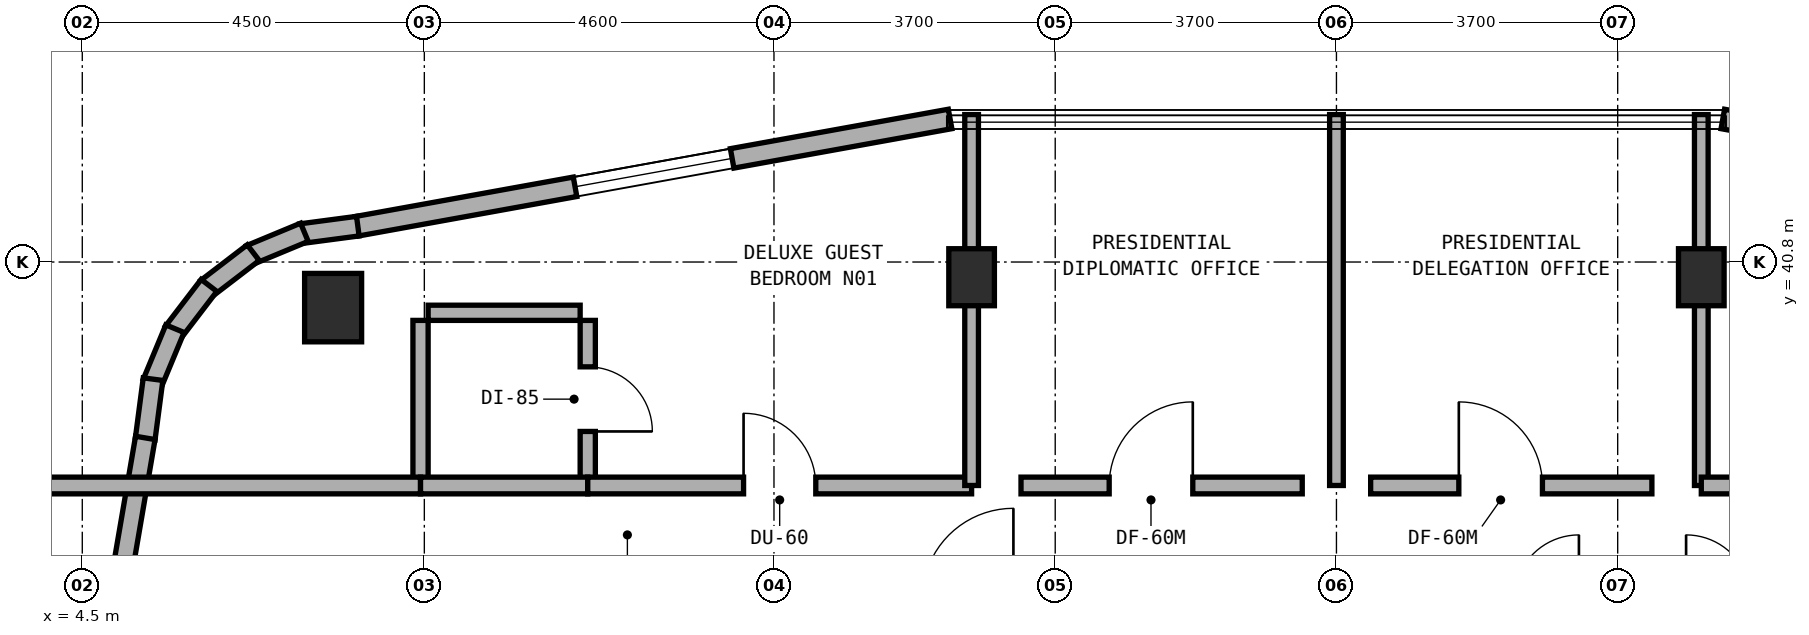
"""IFC4 building model, lengths in metres.
Left out: names, types, materials, properties, quantities, classifications, styles, units other than length and angle.
Written with IfcOpenShell. Run it as: python <this file> out.ifc"""

import sys

from ifc_helpers import new_model, si_unit, direction, frame, frame_2d, origin, origin_2d, place, context, subcontext, project, spatial, rectangle, extrude, element, fill, save


model = new_model("IFC4")
c1 = context("Model", 3, precision=1e-05, world=origin(), true_north=direction((0.0, 1.0)))
c2 = subcontext(c1, "Body", "Model", "MODEL_VIEW")
j1 = project(units=[si_unit("LENGTHUNIT", "METRE"), si_unit("PLANEANGLEUNIT", "RADIAN")], contexts=[c1])
p1 = place(None, origin())
s1 = spatial("IfcSite", under=j1, at=p1, CompositionType="ELEMENT")
p2 = place(p1, origin())
s2 = spatial("IfcBuilding", under=s1, at=p2, CompositionType="ELEMENT")
p3 = place(p2, frame((0.0, 0.0, 257.6)))
s3 = spatial("IfcBuildingStorey", under=s2, at=p3, CompositionType="ELEMENT", Elevation=257.6)
for number, where, z_axis, x_axis in (
    (1, (16.2, 40.6, 0.0), (0.0, 0.0, 1.0), (1.0, 0.0, 0.0)),
    (2, (25.8, 40.6, 0.0), (0.0, 0.0, 1.0), (1.0, 0.0, 0.0)),
):
    element("IfcColumn", number, at=place(p3, frame(where, z_axis=z_axis, x_axis=x_axis)), inside=s3, PredefinedType="COLUMN", context=c2, shape_type="SweptSolid", body=[
        extrude(rectangle(XDim=0.6, YDim=0.75, at=origin_2d()), origin(), (0.0, 0.0, 1.0), 3.6),
    ])
p4 = place(p3, frame((7.8, 40.2, 0.0), z_axis=(0.0, 0.0, 1.0), x_axis=(1.0, 0.0, 0.0)))
e3 = element("IfcColumn", 3, at=p4, inside=s3, PredefinedType="COLUMN", context=c2, shape_type="SweptSolid", body=[
    extrude(rectangle(XDim=0.75, YDim=0.9, at=origin_2d()), origin(), (0.0, 0.0, 1.0), 3.6),
])
p5 = place(p3, frame((33.885, 41.271, 0.0), z_axis=(0.0, 0.0, 1.0), x_axis=(-0.984039441158, 0.177950493803, 0.0)))
e4 = element("IfcWall", 4, at=p5, inside=s3, PredefinedType="STANDARD", context=c2, shape_type="SweptSolid", body=[
    extrude(rectangle(XDim=7.928, YDim=0.26, at=frame_2d((3.964, 0.0))), origin(), (0.0, 0.0, 1.0), 3.32),
])
p6 = place(p5, frame((2.914, 0.0, 0.85)))
e5 = element("IfcOpeningElement", 5, at=p6, cuts=e4, PredefinedType="OPENING", context=c2, shape_type="SweptSolid", body=[
    extrude(rectangle(XDim=2.1, YDim=1.5, at=frame_2d((1.05, 0.75))), frame((0.0, 0.14, 0.0), z_axis=(0.0, -1.0, 0.0), x_axis=(1.0, 0.0, 0.0)), (0.0, 0.0, 1.0), 0.28),
])
p7 = place(p3, frame((15.917, 42.682, 0.0), z_axis=(0.0, 0.0, 1.0), x_axis=(-0.984039441158, -0.177950493803, 0.0)))
e6 = element("IfcWall", 6, at=p7, inside=s3, PredefinedType="STANDARD", context=c2, shape_type="SweptSolid", body=[
    extrude(rectangle(XDim=7.928, YDim=0.26, at=frame_2d((3.964, 0.0))), origin(), (0.0, 0.0, 1.0), 3.32),
])
p8 = place(p7, frame((2.914, 0.0, 0.85)))
e7 = element("IfcOpeningElement", 7, at=p8, cuts=e6, PredefinedType="OPENING", context=c2, shape_type="SweptSolid", body=[
    extrude(rectangle(XDim=2.1, YDim=1.5, at=frame_2d((1.05, 0.75))), frame((0.0, 0.14, 0.0), z_axis=(0.0, -1.0, 0.0), x_axis=(1.0, 0.0, 0.0)), (0.0, 0.0, 1.0), 0.28),
])
p9 = place(p3, frame((8.125, 41.272, 0.0), z_axis=(0.0, 0.0, 1.0), x_axis=(-0.99139921394, -0.130872451645, 0.0)))
e8 = element("IfcWall", 8, at=p9, inside=s3, PredefinedType="STANDARD", context=c2, shape_type="SweptSolid", body=[
    extrude(rectangle(XDim=0.756, YDim=0.26, at=frame_2d((0.378, 0.0))), origin(), (0.0, 0.0, 1.0), 3.32),
])
for number, where, z_axis, x_axis in (
    (9, (7.422, 41.191, 0.0), (0.0, 0.0, 1.0), (-0.924, -0.383, 0.0)),
    (10, (6.749, 40.923, 0.0), (0.0, 0.0, 1.0), (-0.794, -0.608, 0.0)),
    (11, (6.167, 40.492, 0.0), (0.0, 0.0, 1.0), (-0.608, -0.794, 0.0)),
    (12, (5.719, 39.923, 0.0), (0.0, 0.0, 1.0), (-0.383, -0.924, 0.0)),
):
    element("IfcWall", number, at=place(p3, frame(where, z_axis=z_axis, x_axis=x_axis)), inside=s3, PredefinedType="STANDARD", context=c2, shape_type="SweptSolid", body=[
        extrude(rectangle(XDim=0.772, YDim=0.26, at=frame_2d((0.386, 0.0))), origin(), (0.0, 0.0, 1.0), 3.32),
    ])
p10 = place(p3, frame((5.431, 39.259, 0.0), z_axis=(0.0, 0.0, 1.0), x_axis=(-0.130302751316, -0.991474252313, 0.0)))
e13 = element("IfcWall", 13, at=p10, inside=s3, PredefinedType="STANDARD", context=c2, shape_type="SweptSolid", body=[
    extrude(rectangle(XDim=0.791, YDim=0.26, at=frame_2d((0.396, 0.0))), origin(), (0.0, 0.0, 1.0), 3.32),
])
p11 = place(p3, frame((5.329, 38.486, 0.0), z_axis=(0.0, 0.0, 1.0), x_axis=(-0.169038545376, -0.985609440994, 0.0)))
e14 = element("IfcWall", 14, at=p11, inside=s3, PredefinedType="STANDARD", context=c2, shape_type="SweptSolid", body=[
    extrude(rectangle(XDim=8.342, YDim=0.26, at=frame_2d((4.171, 0.0))), origin(), (0.0, 0.0, 1.0), 3.32),
])
p12 = place(p11, frame((3.496, 0.0, 0.85)))
e15 = element("IfcOpeningElement", 15, at=p12, cuts=e14, PredefinedType="OPENING", context=c2, shape_type="SweptSolid", body=[
    extrude(rectangle(XDim=2.1, YDim=1.5, at=frame_2d((1.05, 0.75))), frame((0.0, 0.14, 0.0), z_axis=(0.0, -1.0, 0.0), x_axis=(1.0, 0.0, 0.0)), (0.0, 0.0, 1.0), 0.28),
])
p13 = place(p3, frame((11.15, 37.96, 0.0), z_axis=(0.0, 0.0, 1.0), x_axis=(0.0, 1.0, 0.0)))
e16 = element("IfcWall", 16, at=p13, inside=s3, PredefinedType="PLUMBINGWALL", context=c2, shape_type="SweptSolid", body=[
    extrude(rectangle(XDim=2.072, YDim=0.2, at=frame_2d((1.036, 0.0))), origin(), (0.0, 0.0, 1.0), 2.895),
])
p14 = place(p13, frame((0.611, 0.0, 0.0)))
e17 = element("IfcOpeningElement", 17, at=p14, cuts=e16, PredefinedType="OPENING", context=c2, shape_type="SweptSolid", body=[
    extrude(rectangle(XDim=0.85, YDim=2.1, at=frame_2d((0.425, 1.05))), frame((0.0, 0.11, 0.0), z_axis=(0.0, -1.0, 0.0), x_axis=(1.0, 0.0, 0.0)), (0.0, 0.0, 1.0), 0.22),
])
p15 = place(p3, frame((9.05, 40.132, 0.0), z_axis=(0.0, 0.0, 1.0), x_axis=(1.0, 0.0, 0.0)))
e18 = element("IfcWall", 18, at=p15, inside=s3, PredefinedType="PLUMBINGWALL", context=c2, shape_type="SweptSolid", body=[
    extrude(rectangle(XDim=2.0, YDim=0.2, at=frame_2d((1.0, 0.0))), origin(), (0.0, 0.0, 1.0), 3.015),
])
p16 = place(p3, frame((8.95, 37.96, 0.0), z_axis=(0.0, 0.0, 1.0), x_axis=(0.0, 1.0, 0.0)))
e19 = element("IfcWall", 19, at=p16, inside=s3, PredefinedType="PLUMBINGWALL", context=c2, shape_type="SweptSolid", body=[
    extrude(rectangle(XDim=2.072, YDim=0.2, at=frame_2d((1.036, 0.0))), origin(), (0.0, 0.0, 1.0), 2.895),
])
p17 = place(p3, frame((3.96, 37.86, 0.0), z_axis=(0.0, 0.0, 1.0), x_axis=(1.0, 0.0, 0.0)))
e20 = element("IfcWall", 20, at=p17, inside=s3, PredefinedType="SOLIDWALL", context=c2, shape_type="SweptSolid", body=[
    extrude(rectangle(XDim=4.99, YDim=0.22, at=frame_2d((2.495, 0.0))), origin(), (0.0, 0.0, 1.0), 2.795),
])
p18 = place(p3, frame((8.95, 37.86, 0.0), z_axis=(0.0, 0.0, 1.0), x_axis=(1.0, 0.0, 0.0)))
e21 = element("IfcWall", 21, at=p18, inside=s3, PredefinedType="SOLIDWALL", context=c2, shape_type="SweptSolid", body=[
    extrude(rectangle(XDim=2.2, YDim=0.22, at=frame_2d((1.1, 0.0))), origin(), (0.0, 0.0, 1.0), 3.32),
])
p19 = place(p3, frame((11.15, 37.86, 0.0), z_axis=(0.0, 0.0, 1.0), x_axis=(1.0, 0.0, 0.0)))
e22 = element("IfcWall", 22, at=p19, inside=s3, PredefinedType="SOLIDWALL", context=c2, shape_type="SweptSolid", body=[
    extrude(rectangle(XDim=5.05, YDim=0.22, at=frame_2d((2.525, 0.0))), origin(), (0.0, 0.0, 1.0), 2.795),
])
p20 = place(p19, frame((2.05, 0.0, 0.0)))
e23 = element("IfcOpeningElement", 23, at=p20, cuts=e22, PredefinedType="OPENING", context=c2, shape_type="SweptSolid", body=[
    extrude(rectangle(XDim=0.95, YDim=2.1, at=frame_2d((0.475, 1.05))), frame((0.0, 0.12, 0.0), z_axis=(0.0, -1.0, 0.0), x_axis=(1.0, 0.0, 0.0)), (0.0, 0.0, 1.0), 0.24),
])
p21 = place(p3, frame((16.2, 37.86, 0.0), z_axis=(0.0, 0.0, 1.0), x_axis=(0.0, 1.0, 0.0)))
e24 = element("IfcWall", 24, at=p21, inside=s3, PredefinedType="SOLIDWALL", context=c2, shape_type="SweptSolid", body=[
    extrude(rectangle(XDim=4.88, YDim=0.18, at=frame_2d((2.44, 0.0))), origin(), (0.0, 0.0, 1.0), 2.795),
])
p22 = place(p3, frame((21.0, 37.86, 0.0), z_axis=(0.0, 0.0, 1.0), x_axis=(0.0, 1.0, 0.0)))
e25 = element("IfcWall", 25, at=p22, inside=s3, PredefinedType="SOLIDWALL", context=c2, shape_type="SweptSolid", body=[
    extrude(rectangle(XDim=4.88, YDim=0.18, at=frame_2d((2.44, 0.0))), origin(), (0.0, 0.0, 1.0), 2.895),
])
p23 = place(p3, frame((16.85, 37.86, 0.0), z_axis=(0.0, 0.0, 1.0), x_axis=(1.0, 0.0, 0.0)))
e26 = element("IfcWall", 26, at=p23, inside=s3, PredefinedType="SOLIDWALL", context=c2, shape_type="SweptSolid", body=[
    extrude(rectangle(XDim=3.7, YDim=0.22, at=frame_2d((1.85, 0.0))), origin(), (0.0, 0.0, 1.0), 3.32),
])
p24 = place(p23, frame((1.16, 0.0, 0.0)))
e27 = element("IfcOpeningElement", 27, at=p24, cuts=e26, PredefinedType="OPENING", context=c2, shape_type="SweptSolid", body=[
    extrude(rectangle(XDim=1.1, YDim=2.1, at=frame_2d((0.55, 1.05))), frame((0.0, 0.12, 0.0), z_axis=(0.0, -1.0, 0.0), x_axis=(1.0, 0.0, 0.0)), (0.0, 0.0, 1.0), 0.24),
])
p25 = place(p3, frame((21.45, 37.86, 0.0), z_axis=(0.0, 0.0, 1.0), x_axis=(1.0, 0.0, 0.0)))
e28 = element("IfcWall", 28, at=p25, inside=s3, PredefinedType="SOLIDWALL", context=c2, shape_type="SweptSolid", body=[
    extrude(rectangle(XDim=3.7, YDim=0.22, at=frame_2d((1.85, 0.0))), origin(), (0.0, 0.0, 1.0), 3.32),
])
p26 = place(p25, frame((1.16, 0.0, 0.0)))
e29 = element("IfcOpeningElement", 29, at=p26, cuts=e28, PredefinedType="OPENING", context=c2, shape_type="SweptSolid", body=[
    extrude(rectangle(XDim=1.1, YDim=2.1, at=frame_2d((0.55, 1.05))), frame((0.0, 0.12, 0.0), z_axis=(0.0, -1.0, 0.0), x_axis=(1.0, 0.0, 0.0)), (0.0, 0.0, 1.0), 0.24),
])
p27 = place(p3, frame((25.8, 37.86, 0.0), z_axis=(0.0, 0.0, 1.0), x_axis=(0.0, 1.0, 0.0)))
e30 = element("IfcWall", 30, at=p27, inside=s3, PredefinedType="SOLIDWALL", context=c2, shape_type="SweptSolid", body=[
    extrude(rectangle(XDim=4.88, YDim=0.18, at=frame_2d((2.44, 0.0))), origin(), (0.0, 0.0, 1.0), 2.795),
])
p28 = place(p3, frame((25.8, 37.86, 0.0), z_axis=(0.0, 0.0, 1.0), x_axis=(1.0, 0.0, 0.0)))
e31 = element("IfcWall", 31, at=p28, inside=s3, PredefinedType="SOLIDWALL", context=c2, shape_type="SweptSolid", body=[
    extrude(rectangle(XDim=5.05, YDim=0.22, at=frame_2d((2.525, 0.0))), origin(), (0.0, 0.0, 1.0), 2.795),
])
p29 = place(p28, frame((2.05, 0.0, 0.0)))
e32 = element("IfcOpeningElement", 32, at=p29, cuts=e31, PredefinedType="OPENING", context=c2, shape_type="SweptSolid", body=[
    extrude(rectangle(XDim=0.95, YDim=2.1, at=frame_2d((0.475, 1.05))), frame((0.0, 0.12, 0.0), z_axis=(0.0, -1.0, 0.0), x_axis=(1.0, 0.0, 0.0)), (0.0, 0.0, 1.0), 0.24),
])
p30 = place(p8, origin())
e33 = element("IfcWindow", 33, at=p30, inside=s3, PartitioningType="SINGLE_PANEL", PredefinedType="WINDOW", context=c2, shape_type="SweptSolid", body=[
    extrude(rectangle(XDim=2.1, YDim=1.5, at=frame_2d((1.05, 0.75))), frame((0.0, 0.03, 0.0), z_axis=(0.0, -1.0, 0.0), x_axis=(1.0, 0.0, 0.0)), (0.0, 0.0, 1.0), 0.06),
])
fill(e7, e33)
p31 = place(p14, frame((0.85, 0.0, 0.0), z_axis=(0.0, 0.0, 1.0), x_axis=(-1.0, 0.0, 0.0)))
e34 = element("IfcDoor", 34, at=p31, inside=s3, OperationType="SINGLE_SWING_RIGHT", PredefinedType="DOOR", context=c2, shape_type="SweptSolid", body=[
    extrude(rectangle(XDim=0.85, YDim=2.1, at=frame_2d((0.425, 1.05))), frame((0.0, 0.025, 0.0), z_axis=(0.0, -1.0, 0.0), x_axis=(1.0, 0.0, 0.0)), (0.0, 0.0, 1.0), 0.05),
])
fill(e17, e34)
p32 = place(p20, origin())
e35 = element("IfcDoor", 35, at=p32, inside=s3, OperationType="SINGLE_SWING_LEFT", PredefinedType="DOOR", context=c2, shape_type="SweptSolid", body=[
    extrude(rectangle(XDim=0.95, YDim=2.1, at=frame_2d((0.475, 1.05))), frame((0.0, 0.025, 0.0), z_axis=(0.0, -1.0, 0.0), x_axis=(1.0, 0.0, 0.0)), (0.0, 0.0, 1.0), 0.05),
])
fill(e23, e35)
p33 = place(p24, origin())
e36 = element("IfcDoor", 36, at=p33, inside=s3, OperationType="SINGLE_SWING_RIGHT", PredefinedType="DOOR", context=c2, shape_type="SweptSolid", body=[
    extrude(rectangle(XDim=1.1, YDim=2.1, at=frame_2d((0.55, 1.05))), frame((0.0, 0.025, 0.0), z_axis=(0.0, -1.0, 0.0), x_axis=(1.0, 0.0, 0.0)), (0.0, 0.0, 1.0), 0.05),
])
fill(e27, e36)
p34 = place(p26, origin())
e37 = element("IfcDoor", 37, at=p34, inside=s3, OperationType="SINGLE_SWING_LEFT", PredefinedType="DOOR", context=c2, shape_type="SweptSolid", body=[
    extrude(rectangle(XDim=1.1, YDim=2.1, at=frame_2d((0.55, 1.05))), frame((0.0, 0.025, 0.0), z_axis=(0.0, -1.0, 0.0), x_axis=(1.0, 0.0, 0.0)), (0.0, 0.0, 1.0), 0.05),
])
fill(e29, e37)
save(model, sys.argv[1])
